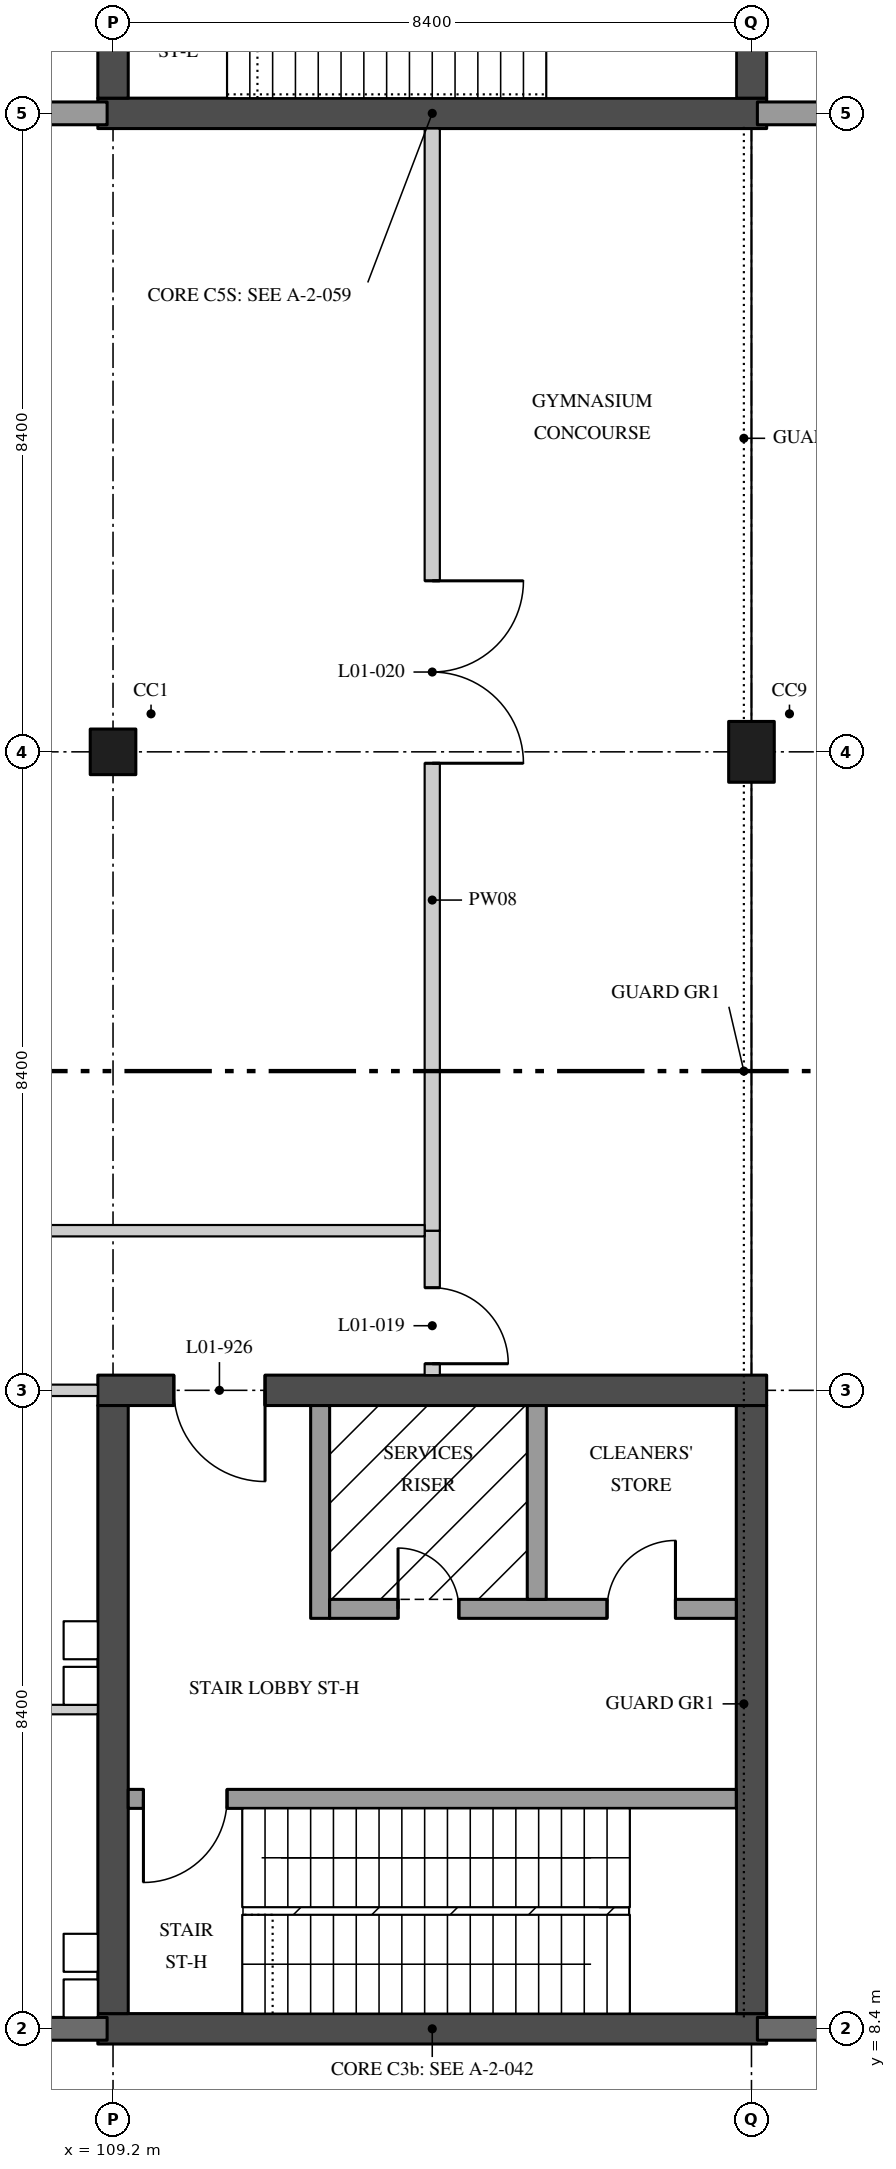
"""IFC4 building model, lengths in metres.
Left out: names, types, materials, properties, quantities, classifications, styles, units other than length and angle.
Written with IfcOpenShell. Run it as: python <this file> out.ifc"""

import sys

from ifc_helpers import new_model, si_unit, direction, frame, frame_2d, origin, origin_2d, place, context, subcontext, project, spatial, polyline, rectangle, outline, extrude, element, fill, save


model = new_model("IFC4")
c1 = context("Model", 3, precision=1e-05, world=origin(), true_north=direction((0.0, 1.0)))
c2 = subcontext(c1, "Body", "Model", "MODEL_VIEW")
j1 = project(units=[si_unit("LENGTHUNIT", "METRE"), si_unit("PLANEANGLEUNIT", "RADIAN")], contexts=[c1])
p1 = place(None, origin())
s1 = spatial("IfcSite", under=j1, at=p1, CompositionType="ELEMENT")
p2 = place(p1, origin())
s2 = spatial("IfcBuilding", under=s1, at=p2, CompositionType="ELEMENT")
p3 = place(p2, frame((0.0, 0.0, 5.4)))
s3 = spatial("IfcBuildingStorey", under=s2, at=p3, CompositionType="ELEMENT", Elevation=5.4)
p4 = place(p3, frame((109.2, 25.2, 0.0), z_axis=(0.0, 0.0, 1.0), x_axis=(1.0, 0.0, 0.0)))
e1 = element("IfcColumn", 1, at=p4, inside=s3, PredefinedType="COLUMN", context=c2, shape_type="SweptSolid", body=[
    extrude(rectangle(XDim=0.6, YDim=0.6, at=origin_2d()), origin(), (0.0, 0.0, 1.0), 3.0),
])
p5 = place(p3, frame((117.6, 25.2, 0.0), z_axis=(0.0, 0.0, 1.0), x_axis=(1.0, 0.0, 0.0)))
e2 = element("IfcColumn", 2, at=p5, inside=s3, PredefinedType="COLUMN", context=c2, shape_type="SweptSolid", body=[
    extrude(rectangle(XDim=0.6, YDim=0.8, at=origin_2d()), origin(), (0.0, 0.0, 1.0), 3.0),
])
p6 = place(p3, frame((109.0, 8.4, 0.0), z_axis=(0.0, 0.0, 1.0), x_axis=(1.0, 0.0, 0.0)))
e3 = element("IfcWall", 3, at=p6, inside=s3, PredefinedType="SHEAR", context=c2, shape_type="SweptSolid", body=[
    extrude(rectangle(XDim=8.8, YDim=0.4, at=frame_2d((4.4, 0.0))), origin(), (0.0, 0.0, 1.0), 3.0),
])
p7 = place(p3, frame((109.0, 16.8, 0.0), z_axis=(0.0, 0.0, 1.0), x_axis=(1.0, 0.0, 0.0)))
e4 = element("IfcWall", 4, at=p7, inside=s3, PredefinedType="SHEAR", context=c2, shape_type="SweptSolid", body=[
    extrude(rectangle(XDim=8.8, YDim=0.4, at=frame_2d((4.4, 0.0))), origin(), (0.0, 0.0, 1.0), 3.0),
])
p8 = place(p7, frame((1.0, 0.0, 0.0)))
e5 = element("IfcOpeningElement", 5, at=p8, cuts=e4, PredefinedType="OPENING", context=c2, shape_type="SweptSolid", body=[
    extrude(rectangle(XDim=1.2, YDim=2.1, at=frame_2d((0.6, 1.05))), frame((0.0, 0.21, 0.0), z_axis=(0.0, -1.0, 0.0), x_axis=(1.0, 0.0, 0.0)), (0.0, 0.0, 1.0), 0.42),
])
for number, where, z_axis, x_axis in (
    (6, (109.2, 8.6, 0.0), (0.0, 0.0, 1.0), (0.0, 1.0, 0.0)),
    (7, (117.6, 8.6, 0.0), (0.0, 0.0, 1.0), (0.0, 1.0, 0.0)),
):
    element("IfcWall", number, at=place(p3, frame(where, z_axis=z_axis, x_axis=x_axis)), inside=s3, PredefinedType="SHEAR", context=c2, shape_type="SweptSolid", body=[
        extrude(rectangle(XDim=8.0, YDim=0.4, at=frame_2d((4.0, 0.0))), origin(), (0.0, 0.0, 1.0), 3.0),
    ])
p9 = place(p3, frame((109.4, 11.425, 0.0), z_axis=(0.0, 0.0, 1.0), x_axis=(1.0, 0.0, 0.0)))
e8 = element("IfcWall", 8, at=p9, inside=s3, PredefinedType="SOLIDWALL", context=c2, shape_type="SweptSolid", body=[
    extrude(rectangle(XDim=8.0, YDim=0.25, at=frame_2d((4.0, 0.0))), origin(), (0.0, 0.0, 1.0), 3.0),
])
p10 = place(p9, frame((0.2, 0.0, 0.0)))
e9 = element("IfcOpeningElement", 9, at=p10, cuts=e8, PredefinedType="OPENING", context=c2, shape_type="SweptSolid", body=[
    extrude(rectangle(XDim=1.1, YDim=2.1, at=frame_2d((0.55, 1.05))), frame((0.0, 0.135, 0.0), z_axis=(0.0, -1.0, 0.0), x_axis=(1.0, 0.0, 0.0)), (0.0, 0.0, 1.0), 0.27),
])
p11 = place(p3, frame((111.925, 13.8, 0.0), z_axis=(0.0, 0.0, 1.0), x_axis=(0.0, 1.0, 0.0)))
e10 = element("IfcWall", 10, at=p11, inside=s3, PredefinedType="SOLIDWALL", context=c2, shape_type="SweptSolid", body=[
    extrude(rectangle(XDim=2.8, YDim=0.25, at=frame_2d((1.4, 0.0))), origin(), (0.0, 0.0, 1.0), 3.0),
])
p12 = place(p3, frame((112.05, 13.925, 0.0), z_axis=(0.0, 0.0, 1.0), x_axis=(1.0, 0.0, 0.0)))
e11 = element("IfcWall", 11, at=p12, inside=s3, PredefinedType="SOLIDWALL", context=c2, shape_type="SweptSolid", body=[
    extrude(rectangle(XDim=5.35, YDim=0.25, at=frame_2d((2.675, 0.0))), origin(), (0.0, 0.0, 1.0), 3.0),
])
p13 = place(p12, frame((3.65, 0.0, 0.0)))
e12 = element("IfcOpeningElement", 12, at=p13, cuts=e11, PredefinedType="OPENING", context=c2, shape_type="SweptSolid", body=[
    extrude(rectangle(XDim=0.9, YDim=2.1, at=frame_2d((0.45, 1.05))), frame((0.0, 0.135, 0.0), z_axis=(0.0, -1.0, 0.0), x_axis=(1.0, 0.0, 0.0)), (0.0, 0.0, 1.0), 0.27),
])
p14 = place(p12, frame((0.9, 0.0, 0.0)))
e13 = element("IfcOpeningElement", 13, at=p14, cuts=e11, PredefinedType="OPENING", context=c2, shape_type="SweptSolid", body=[
    extrude(rectangle(XDim=0.8, YDim=2.1, at=frame_2d((0.4, 1.05))), frame((0.0, 0.135, 0.0), z_axis=(0.0, -1.0, 0.0), x_axis=(1.0, 0.0, 0.0)), (0.0, 0.0, 1.0), 0.27),
])
p15 = place(p3, frame((114.775, 14.05, 0.0), z_axis=(0.0, 0.0, 1.0), x_axis=(0.0, 1.0, 0.0)))
e14 = element("IfcWall", 14, at=p15, inside=s3, PredefinedType="SOLIDWALL", context=c2, shape_type="SweptSolid", body=[
    extrude(rectangle(XDim=2.55, YDim=0.25, at=frame_2d((1.275, 0.0))), origin(), (0.0, 0.0, 1.0), 3.0),
])
p16 = place(p3, frame((109.0, 33.6, 0.0), z_axis=(0.0, 0.0, 1.0), x_axis=(1.0, 0.0, 0.0)))
e15 = element("IfcWall", 15, at=p16, inside=s3, PredefinedType="SHEAR", context=c2, shape_type="SweptSolid", body=[
    extrude(rectangle(XDim=8.8, YDim=0.4, at=frame_2d((4.4, 0.0))), origin(), (0.0, 0.0, 1.0), 4.37),
])
p17 = place(p3, frame((109.2, 33.8, 0.0), z_axis=(0.0, 0.0, 1.0), x_axis=(0.0, 1.0, 0.0)))
e16 = element("IfcWall", 16, at=p17, inside=s3, PredefinedType="SHEAR", context=c2, shape_type="SweptSolid", body=[
    extrude(rectangle(XDim=8.0, YDim=0.4, at=frame_2d((4.0, 0.0))), origin(), (0.0, 0.0, 1.0), 4.37),
])
p18 = place(p17, frame((3.875, 0.0, 0.0)))
e17 = element("IfcOpeningElement", 17, at=p18, cuts=e16, PredefinedType="OPENING", context=c2, shape_type="SweptSolid", body=[
    extrude(rectangle(XDim=1.2, YDim=2.1, at=frame_2d((0.6, 1.05))), frame((0.0, 0.21, 0.0), z_axis=(0.0, -1.0, 0.0), x_axis=(1.0, 0.0, 0.0)), (0.0, 0.0, 1.0), 0.42),
])
p19 = place(p3, frame((117.6, 33.8, 0.0), z_axis=(0.0, 0.0, 1.0), x_axis=(0.0, 1.0, 0.0)))
e18 = element("IfcWall", 18, at=p19, inside=s3, PredefinedType="SHEAR", context=c2, shape_type="SweptSolid", body=[
    extrude(rectangle(XDim=8.0, YDim=0.4, at=frame_2d((4.0, 0.0))), origin(), (0.0, 0.0, 1.0), 4.37),
])
p20 = place(p19, frame((3.875, 0.0, 0.0)))
e19 = element("IfcOpeningElement", 19, at=p20, cuts=e18, PredefinedType="OPENING", context=c2, shape_type="SweptSolid", body=[
    extrude(rectangle(XDim=1.2, YDim=2.1, at=frame_2d((0.6, 1.05))), frame((0.0, 0.21, 0.0), z_axis=(0.0, -1.0, 0.0), x_axis=(1.0, 0.0, 0.0)), (0.0, 0.0, 1.0), 0.42),
])
p21 = place(p2, origin())
s4 = spatial("IfcBuildingStorey", under=s2, at=p21, CompositionType="ELEMENT", Elevation=0.0)
p22 = place(p21, frame((117.6, 17.0, 0.0), z_axis=(0.0, 0.0, 1.0), x_axis=(0.0, 1.0, 0.0)))
e20 = element("IfcWall", 20, at=p22, inside=s4, PredefinedType="PARTITIONING", context=c2, shape_type="SweptSolid", body=[
    extrude(rectangle(XDim=1.9, YDim=0.15, at=frame_2d((0.95, 0.0))), origin(), (0.0, 0.0, 1.0), 8.375),
])
p23 = place(p22, frame((0.45, 0.0, 0.0)))
e21 = element("IfcOpeningElement", 21, at=p23, cuts=e20, PredefinedType="OPENING", context=c2, shape_type="SweptSolid", body=[
    extrude(rectangle(XDim=1.0, YDim=2.1, at=frame_2d((0.5, 1.05))), frame((0.0, 0.085, 0.0), z_axis=(0.0, -1.0, 0.0), x_axis=(1.0, 0.0, 0.0)), (0.0, 0.0, 1.0), 0.17),
])
p24 = place(p21, frame((117.6, 18.9, 0.0), z_axis=(0.0, 0.0, 1.0), x_axis=(0.0, 1.0, 0.0)))
e22 = element("IfcWall", 22, at=p24, inside=s4, PredefinedType="PARTITIONING", context=c2, shape_type="SweptSolid", body=[
    extrude(rectangle(XDim=5.85, YDim=0.25, at=frame_2d((2.925, 0.0))), origin(), (0.0, 0.0, 1.0), 8.375),
])
p25 = place(p21, frame((117.6, 25.65, 0.0), z_axis=(0.0, 0.0, 1.0), x_axis=(0.0, 1.0, 0.0)))
e23 = element("IfcWall", 23, at=p25, inside=s4, PredefinedType="PARTITIONING", context=c2, shape_type="SweptSolid", body=[
    extrude(rectangle(XDim=7.75, YDim=0.25, at=frame_2d((3.875, 0.0))), origin(), (0.0, 0.0, 1.0), 8.375),
])
p26 = place(p3, frame((113.4, 17.0, 0.0), z_axis=(0.0, 0.0, 1.0), x_axis=(0.0, 1.0, 0.0)))
e24 = element("IfcWall", 24, at=p26, inside=s3, PredefinedType="PARTITIONING", context=c2, shape_type="SweptSolid", body=[
    extrude(rectangle(XDim=1.9, YDim=0.2, at=frame_2d((0.95, 0.0))), origin(), (0.0, 0.0, 1.0), 4.37),
])
p27 = place(p26, frame((0.15, 0.0, 0.0)))
e25 = element("IfcOpeningElement", 25, at=p27, cuts=e24, PredefinedType="OPENING", context=c2, shape_type="SweptSolid", body=[
    extrude(rectangle(XDim=1.0, YDim=2.4, at=frame_2d((0.5, 1.2))), frame((0.0, 0.11, 0.0), z_axis=(0.0, -1.0, 0.0), x_axis=(1.0, 0.0, 0.0)), (0.0, 0.0, 1.0), 0.22),
])
p28 = place(p3, frame((113.4, 18.9, 0.0), z_axis=(0.0, 0.0, 1.0), x_axis=(0.0, 1.0, 0.0)))
e26 = element("IfcWall", 26, at=p28, inside=s3, PredefinedType="PARTITIONING", context=c2, shape_type="SweptSolid", body=[
    extrude(rectangle(XDim=14.5, YDim=0.2, at=frame_2d((7.25, 0.0))), origin(), (0.0, 0.0, 1.0), 4.37),
])
p29 = place(p28, frame((6.15, 0.0, 0.0)))
e27 = element("IfcOpeningElement", 27, at=p29, cuts=e26, PredefinedType="OPENING", context=c2, shape_type="SweptSolid", body=[
    extrude(rectangle(XDim=2.4, YDim=2.7, at=frame_2d((1.2, 1.35))), frame((0.0, 0.11, 0.0), z_axis=(0.0, -1.0, 0.0), x_axis=(1.0, 0.0, 0.0)), (0.0, 0.0, 1.0), 0.22),
])
p30 = place(p3, frame((100.875, 18.9, 0.0), z_axis=(0.0, 0.0, 1.0), x_axis=(1.0, 0.0, 0.0)))
e28 = element("IfcWall", 28, at=p30, inside=s3, PredefinedType="PARTITIONING", context=c2, shape_type="SweptSolid", body=[
    extrude(rectangle(XDim=12.425, YDim=0.15, at=frame_2d((6.212, 0.0))), origin(), (0.0, 0.0, 1.0), 4.37),
])
p31 = place(p30, frame((4.75, 0.0, 0.0)))
e29 = element("IfcOpeningElement", 29, at=p31, cuts=e28, PredefinedType="OPENING", context=c2, shape_type="SweptSolid", body=[
    extrude(rectangle(XDim=2.4, YDim=2.7, at=frame_2d((1.2, 1.35))), frame((0.0, 0.085, 0.0), z_axis=(0.0, -1.0, 0.0), x_axis=(1.0, 0.0, 0.0)), (0.0, 0.0, 1.0), 0.17),
])
p32 = place(p3, frame((101.1, 16.8, 0.0), z_axis=(0.0, 0.0, 1.0), x_axis=(1.0, 0.0, 0.0)))
e30 = element("IfcWall", 30, at=p32, inside=s3, PredefinedType="PARTITIONING", context=c2, shape_type="SweptSolid", body=[
    extrude(rectangle(XDim=7.9, YDim=0.15, at=frame_2d((3.95, 0.0))), origin(), (0.0, 0.0, 1.0), 4.37),
])
p33 = place(p32, frame((3.45, 0.0, 0.0)))
e31 = element("IfcOpeningElement", 31, at=p33, cuts=e30, PredefinedType="OPENING", context=c2, shape_type="SweptSolid", body=[
    extrude(rectangle(XDim=0.9, YDim=2.1, at=frame_2d((0.45, 1.05))), frame((0.0, 0.085, 0.0), z_axis=(0.0, -1.0, 0.0), x_axis=(1.0, 0.0, 0.0)), (0.0, 0.0, 1.0), 0.17),
])
p34 = place(p3, frame((105.0, 12.6, 0.0), z_axis=(0.0, 0.0, 1.0), x_axis=(1.0, 0.0, 0.0)))
e32 = element("IfcWall", 32, at=p34, inside=s3, PredefinedType="PARTITIONING", context=c2, shape_type="SweptSolid", body=[
    extrude(rectangle(XDim=4.0, YDim=0.125, at=frame_2d((2.0, 0.0))), origin(), (0.0, 0.0, 1.0), 4.37),
])
p35 = place(p34, frame((1.9, 0.0, 0.0)))
e33 = element("IfcOpeningElement", 33, at=p35, cuts=e32, PredefinedType="OPENING", context=c2, shape_type="SweptSolid", body=[
    extrude(rectangle(XDim=0.9, YDim=2.1, at=frame_2d((0.45, 1.05))), frame((0.0, 0.073, 0.0), z_axis=(0.0, -1.0, 0.0), x_axis=(1.0, 0.0, 0.0)), (0.0, 0.0, 1.0), 0.145),
])
p36 = place(p3, frame((117.678, 8.4, 0.0), z_axis=(0.0, 0.0, 1.0), x_axis=(1.0, 0.0, 0.0)))
e34 = element("IfcWall", 34, at=p36, inside=s3, PredefinedType="SOLIDWALL", context=c2, shape_type="SweptSolid", body=[
    extrude(outline(polyline([(0.0, 0.0), (8.022, 0.0), (8.022, 4.0), (0.122, 4.0), (0.0, 4.0), (0.0, 0.0)])), frame((0.0, 0.15, 0.0), z_axis=(0.0, -1.0, 0.0), x_axis=(1.0, 0.0, 0.0)), (0.0, 0.0, 1.0), 0.3),
])
p37 = place(p3, frame((101.1, 8.4, 0.0), z_axis=(0.0, 0.0, 1.0), x_axis=(1.0, 0.0, 0.0)))
e35 = element("IfcWall", 35, at=p37, inside=s3, PredefinedType="SOLIDWALL", context=c2, shape_type="SweptSolid", body=[
    extrude(outline(polyline([(0.0, 0.0), (8.022, 0.0), (8.022, 4.0), (7.9, 4.0), (0.0, 4.0), (0.0, 0.0)])), frame((0.0, 0.15, 0.0), z_axis=(0.0, -1.0, 0.0), x_axis=(1.0, 0.0, 0.0)), (0.0, 0.0, 1.0), 0.3),
])
p38 = place(p37, frame((1.35, 0.0, 1.5)))
e36 = element("IfcOpeningElement", 36, at=p38, cuts=e35, PredefinedType="OPENING", context=c2, shape_type="SweptSolid", body=[
    extrude(rectangle(XDim=0.9, YDim=1.2, at=frame_2d((0.45, 0.6))), frame((0.0, 0.16, 0.0), z_axis=(0.0, -1.0, 0.0), x_axis=(1.0, 0.0, 0.0)), (0.0, 0.0, 1.0), 0.32),
])
p39 = place(p3, frame((117.678, 33.6, 0.0), z_axis=(0.0, 0.0, 1.0), x_axis=(1.0, 0.0, 0.0)))
e37 = element("IfcWall", 37, at=p39, inside=s3, PredefinedType="SOLIDWALL", context=c2, shape_type="SweptSolid", body=[
    extrude(outline(polyline([(0.0, 0.0), (7.892, 0.0), (7.892, 3.6), (7.872, 3.6), (0.122, 3.6), (0.0, 3.6), (0.0, 0.0)])), frame((0.0, 0.15, 0.0), z_axis=(0.0, -1.0, 0.0), x_axis=(1.0, 0.0, 0.0)), (0.0, 0.0, 1.0), 0.3),
])
p40 = place(p3, frame((109.122, 33.6, 0.0), z_axis=(0.0, 0.0, 1.0), x_axis=(-1.0, 0.0, 0.0)))
e38 = element("IfcWall", 38, at=p40, inside=s3, PredefinedType="SOLIDWALL", context=c2, shape_type="SweptSolid", body=[
    extrude(outline(polyline([(0.0, 0.0), (8.122, 0.0), (8.122, 3.6), (7.872, 3.6), (0.122, 3.6), (0.0, 3.6), (0.0, 0.0)])), frame((0.0, 0.15, 0.0), z_axis=(0.0, -1.0, 0.0), x_axis=(1.0, 0.0, 0.0)), (0.0, 0.0, 1.0), 0.3),
])
p41 = place(p13, origin())
e39 = element("IfcDoor", 39, at=p41, inside=s3, OperationType="SINGLE_SWING_LEFT", PredefinedType="DOOR", context=c2, shape_type="SweptSolid", body=[
    extrude(rectangle(XDim=0.9, YDim=2.1, at=frame_2d((0.45, 1.05))), frame((0.0, 0.035, 0.0), z_axis=(0.0, -1.0, 0.0), x_axis=(1.0, 0.0, 0.0)), (0.0, 0.0, 1.0), 0.07),
])
fill(e12, e39)
p42 = place(p8, frame((1.2, 0.0, 0.0), z_axis=(0.0, 0.0, 1.0), x_axis=(-1.0, 0.0, 0.0)))
e40 = element("IfcDoor", 40, at=p42, inside=s3, OperationType="SINGLE_SWING_RIGHT", PredefinedType="DOOR", context=c2, shape_type="SweptSolid", body=[
    extrude(rectangle(XDim=1.2, YDim=2.1, at=frame_2d((0.6, 1.05))), frame((0.0, 0.035, 0.0), z_axis=(0.0, -1.0, 0.0), x_axis=(1.0, 0.0, 0.0)), (0.0, 0.0, 1.0), 0.07),
])
fill(e5, e40)
p43 = place(p14, origin())
e41 = element("IfcDoor", 41, at=p43, inside=s3, OperationType="SINGLE_SWING_RIGHT", PredefinedType="DOOR", context=c2, shape_type="SweptSolid", body=[
    extrude(rectangle(XDim=0.8, YDim=2.1, at=frame_2d((0.4, 1.05))), frame((0.0, 0.035, 0.0), z_axis=(0.0, -1.0, 0.0), x_axis=(1.0, 0.0, 0.0)), (0.0, 0.0, 1.0), 0.07),
])
fill(e13, e41)
p44 = place(p10, frame((1.1, 0.0, 0.0), z_axis=(0.0, 0.0, 1.0), x_axis=(-1.0, 0.0, 0.0)))
e42 = element("IfcDoor", 42, at=p44, inside=s3, OperationType="SINGLE_SWING_LEFT", PredefinedType="DOOR", context=c2, shape_type="SweptSolid", body=[
    extrude(rectangle(XDim=1.1, YDim=2.1, at=frame_2d((0.55, 1.05))), frame((0.0, 0.035, 0.0), z_axis=(0.0, -1.0, 0.0), x_axis=(1.0, 0.0, 0.0)), (0.0, 0.0, 1.0), 0.07),
])
fill(e9, e42)
p45 = place(p27, frame((1.0, 0.0, 0.0), z_axis=(0.0, 0.0, 1.0), x_axis=(-1.0, 0.0, 0.0)))
e43 = element("IfcDoor", 43, at=p45, inside=s3, OperationType="SINGLE_SWING_LEFT", PredefinedType="DOOR", context=c2, shape_type="SweptSolid", body=[
    extrude(rectangle(XDim=1.0, YDim=2.4, at=frame_2d((0.5, 1.2))), frame((0.0, 0.03, 0.0), z_axis=(0.0, -1.0, 0.0), x_axis=(1.0, 0.0, 0.0)), (0.0, 0.0, 1.0), 0.06),
])
fill(e25, e43)
p46 = place(p29, frame((2.4, 0.0, 0.0), z_axis=(0.0, 0.0, 1.0), x_axis=(-1.0, 0.0, 0.0)))
e44 = element("IfcDoor", 44, at=p46, inside=s3, OperationType="DOUBLE_DOOR_SINGLE_SWING", PredefinedType="DOOR", context=c2, shape_type="SweptSolid", body=[
    extrude(rectangle(XDim=2.4, YDim=2.7, at=frame_2d((1.2, 1.35))), frame((0.0, 0.03, 0.0), z_axis=(0.0, -1.0, 0.0), x_axis=(1.0, 0.0, 0.0)), (0.0, 0.0, 1.0), 0.06),
])
fill(e27, e44)
save(model, sys.argv[1])
